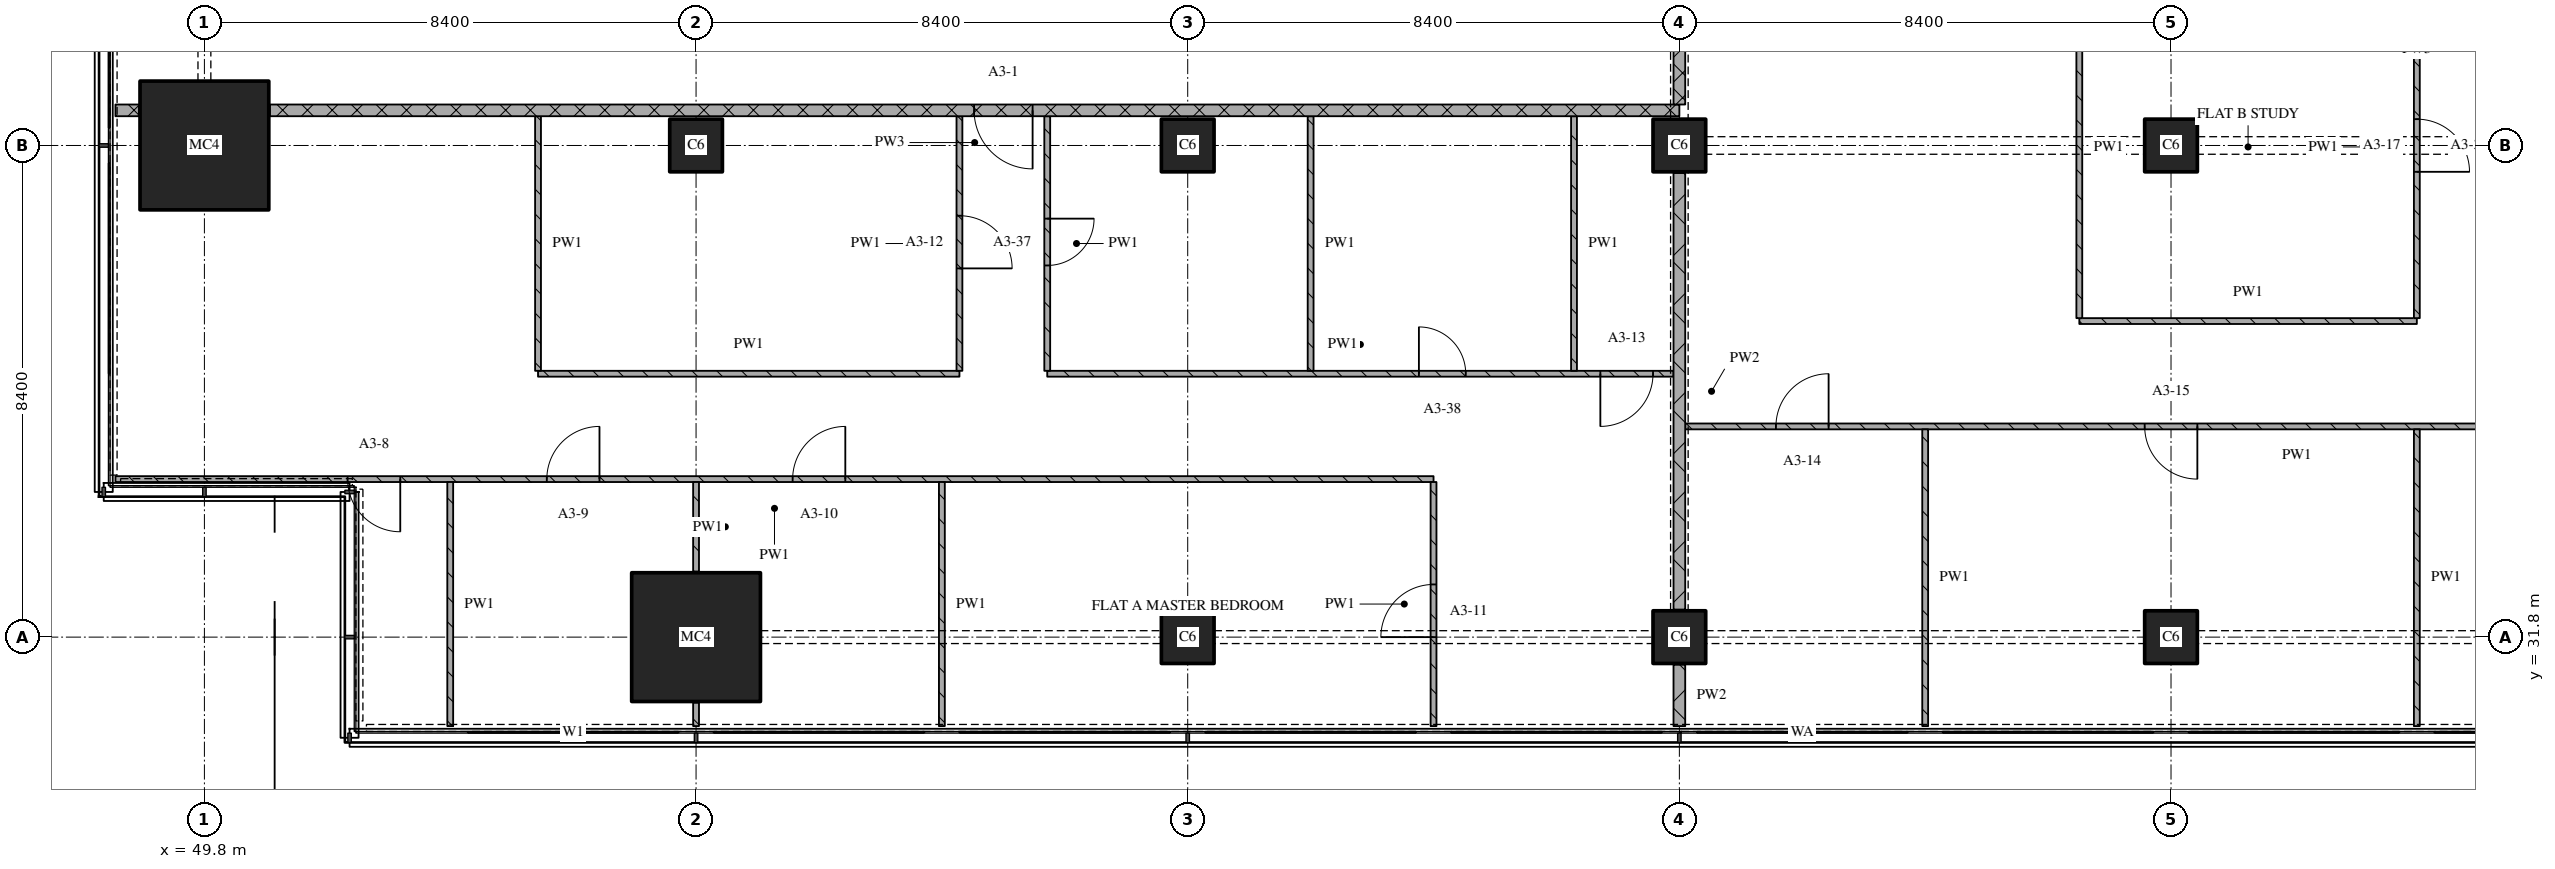
"""IFC4 building model, lengths in metres.
Left out: names, types, materials, properties, quantities, classifications, styles, units other than length and angle.
Written with IfcOpenShell. Run it as: python <this file> out.ifc"""

import sys

from ifc_helpers import new_model, si_unit, direction, frame, frame_2d, origin, origin_2d, place, context, subcontext, project, spatial, rectangle, extrude, element, fill, save


model = new_model("IFC4")
c1 = context("Model", 3, precision=1e-05, world=origin(), true_north=direction((0.0, 1.0)))
c2 = subcontext(c1, "Body", "Model", "MODEL_VIEW")
j1 = project(units=[si_unit("LENGTHUNIT", "METRE"), si_unit("PLANEANGLEUNIT", "RADIAN")], contexts=[c1])
p1 = place(None, origin())
s1 = spatial("IfcSite", under=j1, at=p1, CompositionType="ELEMENT")
p2 = place(p1, origin())
s2 = spatial("IfcBuilding", under=s1, at=p2, CompositionType="ELEMENT")
p3 = place(p2, frame((0.0, 0.0, 58.8)))
s3 = spatial("IfcBuildingStorey", under=s2, at=p3, CompositionType="ELEMENT", Elevation=58.8)
for number, where, z_axis, x_axis in (
    (1, (49.8, 40.2, 0.0), (0.0, 0.0, 1.0), (1.0, 0.0, 0.0)),
    (2, (58.2, 31.8, 0.0), (0.0, 0.0, 1.0), (1.0, 0.0, 0.0)),
):
    element("IfcColumn", number, at=place(p3, frame(where, z_axis=z_axis, x_axis=x_axis)), inside=s3, PredefinedType="COLUMN", context=c2, shape_type="SweptSolid", body=[
        extrude(rectangle(XDim=2.2, YDim=2.2, at=origin_2d()), origin(), (0.0, 0.0, 1.0), 3.6),
    ])
for number, where, z_axis, x_axis in (
    (3, (58.2, 40.2, 0.0), (0.0, 0.0, 1.0), (1.0, 0.0, 0.0)),
    (4, (66.6, 31.8, 0.0), (0.0, 0.0, 1.0), (1.0, 0.0, 0.0)),
    (5, (66.6, 40.2, 0.0), (0.0, 0.0, 1.0), (1.0, 0.0, 0.0)),
    (6, (75.0, 31.8, 0.0), (0.0, 0.0, 1.0), (1.0, 0.0, 0.0)),
    (7, (75.0, 40.2, 0.0), (0.0, 0.0, 1.0), (1.0, 0.0, 0.0)),
    (8, (83.4, 31.8, 0.0), (0.0, 0.0, 1.0), (1.0, 0.0, 0.0)),
    (9, (83.4, 40.2, 0.0), (0.0, 0.0, 1.0), (1.0, 0.0, 0.0)),
):
    element("IfcColumn", number, at=place(p3, frame(where, z_axis=z_axis, x_axis=x_axis)), inside=s3, PredefinedType="COLUMN", context=c2, shape_type="SweptSolid", body=[
        extrude(rectangle(XDim=0.9, YDim=0.9, at=origin_2d()), origin(), (0.0, 0.0, 1.0), 3.6),
    ])
p4 = place(p3, frame((70.8, 34.5, 0.0), z_axis=(0.0, 0.0, 1.0), x_axis=(-1.0, 0.0, 0.0)))
e10 = element("IfcWall", 10, at=p4, inside=s3, PredefinedType="PARTITIONING", context=c2, shape_type="SweptSolid", body=[
    extrude(rectangle(XDim=22.52, YDim=0.1, at=frame_2d((11.26, 0.0))), origin(), (0.0, 0.0, 1.0), 3.32),
])
p5 = place(p4, frame((10.05, 0.0, 0.0)))
e11 = element("IfcOpeningElement", 11, at=p5, cuts=e10, PredefinedType="OPENING", context=c2, shape_type="SweptSolid", body=[
    extrude(rectangle(XDim=0.9, YDim=2.1, at=frame_2d((0.45, 1.05))), frame((0.0, 0.06, 0.0), z_axis=(0.0, -1.0, 0.0), x_axis=(1.0, 0.0, 0.0)), (0.0, 0.0, 1.0), 0.12),
])
p6 = place(p4, frame((14.25, 0.0, 0.0)))
e12 = element("IfcOpeningElement", 12, at=p6, cuts=e10, PredefinedType="OPENING", context=c2, shape_type="SweptSolid", body=[
    extrude(rectangle(XDim=0.9, YDim=2.1, at=frame_2d((0.45, 1.05))), frame((0.0, 0.06, 0.0), z_axis=(0.0, -1.0, 0.0), x_axis=(1.0, 0.0, 0.0)), (0.0, 0.0, 1.0), 0.12),
])
p7 = place(p4, frame((17.654, 0.0, 0.0)))
e13 = element("IfcOpeningElement", 13, at=p7, cuts=e10, PredefinedType="OPENING", context=c2, shape_type="SweptSolid", body=[
    extrude(rectangle(XDim=0.9, YDim=2.1, at=frame_2d((0.45, 1.05))), frame((0.0, 0.06, 0.0), z_axis=(0.0, -1.0, 0.0), x_axis=(1.0, 0.0, 0.0)), (0.0, 0.0, 1.0), 0.12),
])
p8 = place(p3, frame((96.0, 35.4, 0.0), z_axis=(0.0, 0.0, 1.0), x_axis=(-1.0, 0.0, 0.0)))
e14 = element("IfcWall", 14, at=p8, inside=s3, PredefinedType="PARTITIONING", context=c2, shape_type="SweptSolid", body=[
    extrude(rectangle(XDim=20.9, YDim=0.1, at=frame_2d((10.45, 0.0))), origin(), (0.0, 0.0, 1.0), 3.32),
])
p9 = place(p8, frame((12.15, 0.0, 0.0)))
e15 = element("IfcOpeningElement", 15, at=p9, cuts=e14, PredefinedType="OPENING", context=c2, shape_type="SweptSolid", body=[
    extrude(rectangle(XDim=0.9, YDim=2.1, at=frame_2d((0.45, 1.05))), frame((0.0, 0.06, 0.0), z_axis=(0.0, -1.0, 0.0), x_axis=(1.0, 0.0, 0.0)), (0.0, 0.0, 1.0), 0.12),
])
p10 = place(p8, frame((18.45, 0.0, 0.0)))
e16 = element("IfcOpeningElement", 16, at=p10, cuts=e14, PredefinedType="OPENING", context=c2, shape_type="SweptSolid", body=[
    extrude(rectangle(XDim=0.9, YDim=2.1, at=frame_2d((0.45, 1.05))), frame((0.0, 0.06, 0.0), z_axis=(0.0, -1.0, 0.0), x_axis=(1.0, 0.0, 0.0)), (0.0, 0.0, 1.0), 0.12),
])
p11 = place(p3, frame((55.5, 36.3, 0.0), z_axis=(0.0, 0.0, 1.0), x_axis=(1.0, 0.0, 0.0)))
e17 = element("IfcWall", 17, at=p11, inside=s3, PredefinedType="PARTITIONING", context=c2, shape_type="SweptSolid", body=[
    extrude(rectangle(XDim=7.2, YDim=0.1, at=frame_2d((3.6, 0.0))), origin(), (0.0, 0.0, 1.0), 3.32),
])
p12 = place(p3, frame((64.2, 36.3, 0.0), z_axis=(0.0, 0.0, 1.0), x_axis=(1.0, 0.0, 0.0)))
e18 = element("IfcWall", 18, at=p12, inside=s3, PredefinedType="PARTITIONING", context=c2, shape_type="SweptSolid", body=[
    extrude(rectangle(XDim=10.7, YDim=0.1, at=frame_2d((5.35, 0.0))), origin(), (0.0, 0.0, 1.0), 3.32),
])
p13 = place(p12, frame((6.35, 0.0, 0.0)))
e19 = element("IfcOpeningElement", 19, at=p13, cuts=e18, PredefinedType="OPENING", context=c2, shape_type="SweptSolid", body=[
    extrude(rectangle(XDim=0.8, YDim=2.1, at=frame_2d((0.4, 1.05))), frame((0.0, 0.06, 0.0), z_axis=(0.0, -1.0, 0.0), x_axis=(1.0, 0.0, 0.0)), (0.0, 0.0, 1.0), 0.12),
])
p14 = place(p12, frame((9.45, 0.0, 0.0)))
e20 = element("IfcOpeningElement", 20, at=p14, cuts=e18, PredefinedType="OPENING", context=c2, shape_type="SweptSolid", body=[
    extrude(rectangle(XDim=0.9, YDim=2.1, at=frame_2d((0.45, 1.05))), frame((0.0, 0.06, 0.0), z_axis=(0.0, -1.0, 0.0), x_axis=(1.0, 0.0, 0.0)), (0.0, 0.0, 1.0), 0.12),
])
p15 = place(p3, frame((81.833, 37.2, 0.0), z_axis=(0.0, 0.0, 1.0), x_axis=(1.0, 0.0, 0.0)))
e21 = element("IfcWall", 21, at=p15, inside=s3, PredefinedType="PARTITIONING", context=c2, shape_type="SweptSolid", body=[
    extrude(rectangle(XDim=5.767, YDim=0.1, at=frame_2d((2.883, 0.0))), origin(), (0.0, 0.0, 1.0), 3.32),
])
p16 = place(p3, frame((48.28, 40.8, 0.0), z_axis=(0.0, 0.0, 1.0), x_axis=(1.0, 0.0, 0.0)))
e22 = element("IfcWall", 22, at=p16, inside=s3, PredefinedType="PARTITIONING", context=c2, shape_type="SweptSolid", body=[
    extrude(rectangle(XDim=0.4, YDim=0.2, at=frame_2d((0.2, 0.0))), origin(), (0.0, 0.0, 1.0), 3.32),
])
p17 = place(p3, frame((75.0, 40.8, 0.0), z_axis=(0.0, 0.0, 1.0), x_axis=(-1.0, 0.0, 0.0)))
e23 = element("IfcWall", 23, at=p17, inside=s3, PredefinedType="PARTITIONING", context=c2, shape_type="SweptSolid", body=[
    extrude(rectangle(XDim=24.08, YDim=0.2, at=frame_2d((12.04, 0.0))), origin(), (0.0, 0.0, 1.0), 3.32),
])
p18 = place(p17, frame((11.05, 0.0, 0.0)))
e24 = element("IfcOpeningElement", 24, at=p18, cuts=e23, PredefinedType="OPENING", context=c2, shape_type="SweptSolid", body=[
    extrude(rectangle(XDim=1.0, YDim=2.1, at=frame_2d((0.5, 1.05))), frame((0.0, 0.11, 0.0), z_axis=(0.0, -1.0, 0.0), x_axis=(1.0, 0.0, 0.0)), (0.0, 0.0, 1.0), 0.22),
])
p19 = place(p3, frame((54.0, 34.45, 0.0), z_axis=(0.0, 0.0, 1.0), x_axis=(0.0, -1.0, 0.0)))
e25 = element("IfcWall", 25, at=p19, inside=s3, PredefinedType="PARTITIONING", context=c2, shape_type="SweptSolid", body=[
    extrude(rectangle(XDim=4.17, YDim=0.1, at=frame_2d((2.085, 0.0))), origin(), (0.0, 0.0, 1.0), 3.32),
])
p20 = place(p3, frame((55.5, 40.7, 0.0), z_axis=(0.0, 0.0, 1.0), x_axis=(0.0, -1.0, 0.0)))
e26 = element("IfcWall", 26, at=p20, inside=s3, PredefinedType="PARTITIONING", context=c2, shape_type="SweptSolid", body=[
    extrude(rectangle(XDim=4.35, YDim=0.1, at=frame_2d((2.175, 0.0))), origin(), (0.0, 0.0, 1.0), 3.32),
])
p21 = place(p3, frame((58.2, 30.68, 0.0), z_axis=(0.0, 0.0, 1.0), x_axis=(0.0, -1.0, 0.0)))
e27 = element("IfcWall", 27, at=p21, inside=s3, PredefinedType="PARTITIONING", context=c2, shape_type="SweptSolid", body=[
    extrude(rectangle(XDim=0.4, YDim=0.1, at=frame_2d((0.2, 0.0))), origin(), (0.0, 0.0, 1.0), 3.32),
])
p22 = place(p3, frame((58.2, 34.45, 0.0), z_axis=(0.0, 0.0, 1.0), x_axis=(0.0, -1.0, 0.0)))
e28 = element("IfcWall", 28, at=p22, inside=s3, PredefinedType="PARTITIONING", context=c2, shape_type="SweptSolid", body=[
    extrude(rectangle(XDim=1.53, YDim=0.1, at=frame_2d((0.765, 0.0))), origin(), (0.0, 0.0, 1.0), 3.32),
])
p23 = place(p3, frame((62.4, 34.45, 0.0), z_axis=(0.0, 0.0, 1.0), x_axis=(0.0, -1.0, 0.0)))
e29 = element("IfcWall", 29, at=p23, inside=s3, PredefinedType="PARTITIONING", context=c2, shape_type="SweptSolid", body=[
    extrude(rectangle(XDim=4.17, YDim=0.1, at=frame_2d((2.085, 0.0))), origin(), (0.0, 0.0, 1.0), 3.32),
])
p24 = place(p3, frame((62.7, 36.35, 0.0), z_axis=(0.0, 0.0, 1.0), x_axis=(0.0, 1.0, 0.0)))
e30 = element("IfcWall", 30, at=p24, inside=s3, PredefinedType="PARTITIONING", context=c2, shape_type="SweptSolid", body=[
    extrude(rectangle(XDim=4.35, YDim=0.1, at=frame_2d((2.175, 0.0))), origin(), (0.0, 0.0, 1.0), 3.32),
])
p25 = place(p24, frame((1.75, 0.0, 0.0)))
e31 = element("IfcOpeningElement", 31, at=p25, cuts=e30, PredefinedType="OPENING", context=c2, shape_type="SweptSolid", body=[
    extrude(rectangle(XDim=0.9, YDim=2.1, at=frame_2d((0.45, 1.05))), frame((0.0, 0.06, 0.0), z_axis=(0.0, -1.0, 0.0), x_axis=(1.0, 0.0, 0.0)), (0.0, 0.0, 1.0), 0.12),
])
p26 = place(p3, frame((64.2, 40.7, 0.0), z_axis=(0.0, 0.0, 1.0), x_axis=(0.0, -1.0, 0.0)))
e32 = element("IfcWall", 32, at=p26, inside=s3, PredefinedType="PARTITIONING", context=c2, shape_type="SweptSolid", body=[
    extrude(rectangle(XDim=4.35, YDim=0.1, at=frame_2d((2.175, 0.0))), origin(), (0.0, 0.0, 1.0), 3.32),
])
p27 = place(p26, frame((1.75, 0.0, 0.0)))
e33 = element("IfcOpeningElement", 33, at=p27, cuts=e32, PredefinedType="OPENING", context=c2, shape_type="SweptSolid", body=[
    extrude(rectangle(XDim=0.8, YDim=2.1, at=frame_2d((0.4, 1.05))), frame((0.0, 0.06, 0.0), z_axis=(0.0, -1.0, 0.0), x_axis=(1.0, 0.0, 0.0)), (0.0, 0.0, 1.0), 0.12),
])
p28 = place(p3, frame((68.7, 40.7, 0.0), z_axis=(0.0, 0.0, 1.0), x_axis=(0.0, -1.0, 0.0)))
e34 = element("IfcWall", 34, at=p28, inside=s3, PredefinedType="PARTITIONING", context=c2, shape_type="SweptSolid", body=[
    extrude(rectangle(XDim=4.35, YDim=0.1, at=frame_2d((2.175, 0.0))), origin(), (0.0, 0.0, 1.0), 3.32),
])
p29 = place(p3, frame((70.8, 30.28, 0.0), z_axis=(0.0, 0.0, 1.0), x_axis=(0.0, 1.0, 0.0)))
e35 = element("IfcWall", 35, at=p29, inside=s3, PredefinedType="PARTITIONING", context=c2, shape_type="SweptSolid", body=[
    extrude(rectangle(XDim=4.17, YDim=0.1, at=frame_2d((2.085, 0.0))), origin(), (0.0, 0.0, 1.0), 3.32),
])
p30 = place(p29, frame((1.52, 0.0, 0.0)))
e36 = element("IfcOpeningElement", 36, at=p30, cuts=e35, PredefinedType="OPENING", context=c2, shape_type="SweptSolid", body=[
    extrude(rectangle(XDim=0.9, YDim=2.1, at=frame_2d((0.45, 1.05))), frame((0.0, 0.06, 0.0), z_axis=(0.0, -1.0, 0.0), x_axis=(1.0, 0.0, 0.0)), (0.0, 0.0, 1.0), 0.12),
])
p31 = place(p3, frame((73.2, 40.7, 0.0), z_axis=(0.0, 0.0, 1.0), x_axis=(0.0, -1.0, 0.0)))
e37 = element("IfcWall", 37, at=p31, inside=s3, PredefinedType="PARTITIONING", context=c2, shape_type="SweptSolid", body=[
    extrude(rectangle(XDim=4.35, YDim=0.1, at=frame_2d((2.175, 0.0))), origin(), (0.0, 0.0, 1.0), 3.32),
])
p32 = place(p3, frame((75.0, 43.1, 0.0), z_axis=(0.0, 0.0, 1.0), x_axis=(0.0, -1.0, 0.0)))
e38 = element("IfcWall", 38, at=p32, inside=s3, PredefinedType="PARTITIONING", context=c2, shape_type="SweptSolid", body=[
    extrude(rectangle(XDim=2.2, YDim=0.2, at=frame_2d((1.1, 0.0))), origin(), (0.0, 0.0, 1.0), 2.43),
])
p33 = place(p3, frame((75.0, 31.33, 0.0), z_axis=(0.0, 0.0, 1.0), x_axis=(0.0, -1.0, 0.0)))
e39 = element("IfcWall", 39, at=p33, inside=s3, PredefinedType="PARTITIONING", context=c2, shape_type="SweptSolid", body=[
    extrude(rectangle(XDim=1.05, YDim=0.2, at=frame_2d((0.525, 0.0))), origin(), (0.0, 0.0, 1.0), 3.32),
])
p34 = place(p3, frame((75.0, 39.73, 0.0), z_axis=(0.0, 0.0, 1.0), x_axis=(0.0, -1.0, 0.0)))
e40 = element("IfcWall", 40, at=p34, inside=s3, PredefinedType="PARTITIONING", context=c2, shape_type="SweptSolid", body=[
    extrude(rectangle(XDim=7.46, YDim=0.2, at=frame_2d((3.73, 0.0))), origin(), (0.0, 0.0, 1.0), 2.83),
])
p35 = place(p3, frame((79.2, 35.35, 0.0), z_axis=(0.0, 0.0, 1.0), x_axis=(0.0, -1.0, 0.0)))
e41 = element("IfcWall", 41, at=p35, inside=s3, PredefinedType="PARTITIONING", context=c2, shape_type="SweptSolid", body=[
    extrude(rectangle(XDim=5.07, YDim=0.1, at=frame_2d((2.535, 0.0))), origin(), (0.0, 0.0, 1.0), 3.32),
])
p36 = place(p3, frame((81.833, 43.1, 0.0), z_axis=(0.0, 0.0, 1.0), x_axis=(0.0, -1.0, 0.0)))
e42 = element("IfcWall", 42, at=p36, inside=s3, PredefinedType="PARTITIONING", context=c2, shape_type="SweptSolid", body=[
    extrude(rectangle(XDim=5.85, YDim=0.1, at=frame_2d((2.925, 0.0))), origin(), (0.0, 0.0, 1.0), 3.32),
])
p37 = place(p3, frame((87.6, 35.35, 0.0), z_axis=(0.0, 0.0, 1.0), x_axis=(0.0, -1.0, 0.0)))
e43 = element("IfcWall", 43, at=p37, inside=s3, PredefinedType="PARTITIONING", context=c2, shape_type="SweptSolid", body=[
    extrude(rectangle(XDim=5.07, YDim=0.1, at=frame_2d((2.535, 0.0))), origin(), (0.0, 0.0, 1.0), 3.32),
])
p38 = place(p3, frame((87.6, 37.25, 0.0), z_axis=(0.0, 0.0, 1.0), x_axis=(0.0, 1.0, 0.0)))
e44 = element("IfcWall", 44, at=p38, inside=s3, PredefinedType="PARTITIONING", context=c2, shape_type="SweptSolid", body=[
    extrude(rectangle(XDim=5.85, YDim=0.1, at=frame_2d((2.925, 0.0))), origin(), (0.0, 0.0, 1.0), 3.32),
])
p39 = place(p38, frame((2.5, 0.0, 0.0)))
e45 = element("IfcOpeningElement", 45, at=p39, cuts=e44, PredefinedType="OPENING", context=c2, shape_type="SweptSolid", body=[
    extrude(rectangle(XDim=0.9, YDim=2.1, at=frame_2d((0.45, 1.05))), frame((0.0, 0.06, 0.0), z_axis=(0.0, -1.0, 0.0), x_axis=(1.0, 0.0, 0.0)), (0.0, 0.0, 1.0), 0.12),
])
p40 = place(p5, origin())
e46 = element("IfcDoor", 46, at=p40, inside=s3, OperationType="SINGLE_SWING_RIGHT", PredefinedType="DOOR", context=c2, shape_type="SweptSolid", body=[
    extrude(rectangle(XDim=0.9, YDim=2.1, at=frame_2d((0.45, 1.05))), frame((0.0, 0.025, 0.0), z_axis=(0.0, -1.0, 0.0), x_axis=(1.0, 0.0, 0.0)), (0.0, 0.0, 1.0), 0.05),
])
fill(e11, e46)
p41 = place(p6, origin())
e47 = element("IfcDoor", 47, at=p41, inside=s3, OperationType="SINGLE_SWING_RIGHT", PredefinedType="DOOR", context=c2, shape_type="SweptSolid", body=[
    extrude(rectangle(XDim=0.9, YDim=2.1, at=frame_2d((0.45, 1.05))), frame((0.0, 0.025, 0.0), z_axis=(0.0, -1.0, 0.0), x_axis=(1.0, 0.0, 0.0)), (0.0, 0.0, 1.0), 0.05),
])
fill(e12, e47)
p42 = place(p7, origin())
e48 = element("IfcDoor", 48, at=p42, inside=s3, OperationType="SINGLE_SWING_LEFT", PredefinedType="DOOR", context=c2, shape_type="SweptSolid", body=[
    extrude(rectangle(XDim=0.9, YDim=2.1, at=frame_2d((0.45, 1.05))), frame((0.0, 0.025, 0.0), z_axis=(0.0, -1.0, 0.0), x_axis=(1.0, 0.0, 0.0)), (0.0, 0.0, 1.0), 0.05),
])
fill(e13, e48)
p43 = place(p9, origin())
e49 = element("IfcDoor", 49, at=p43, inside=s3, OperationType="SINGLE_SWING_LEFT", PredefinedType="DOOR", context=c2, shape_type="SweptSolid", body=[
    extrude(rectangle(XDim=0.9, YDim=2.1, at=frame_2d((0.45, 1.05))), frame((0.0, 0.025, 0.0), z_axis=(0.0, -1.0, 0.0), x_axis=(1.0, 0.0, 0.0)), (0.0, 0.0, 1.0), 0.05),
])
fill(e15, e49)
p44 = place(p10, origin())
e50 = element("IfcDoor", 50, at=p44, inside=s3, OperationType="SINGLE_SWING_RIGHT", PredefinedType="DOOR", context=c2, shape_type="SweptSolid", body=[
    extrude(rectangle(XDim=0.9, YDim=2.1, at=frame_2d((0.45, 1.05))), frame((0.0, 0.025, 0.0), z_axis=(0.0, -1.0, 0.0), x_axis=(1.0, 0.0, 0.0)), (0.0, 0.0, 1.0), 0.05),
])
fill(e16, e50)
p45 = place(p13, origin())
e51 = element("IfcDoor", 51, at=p45, inside=s3, OperationType="SINGLE_SWING_LEFT", PredefinedType="DOOR", context=c2, shape_type="SweptSolid", body=[
    extrude(rectangle(XDim=0.8, YDim=2.1, at=frame_2d((0.4, 1.05))), frame((0.0, 0.025, 0.0), z_axis=(0.0, -1.0, 0.0), x_axis=(1.0, 0.0, 0.0)), (0.0, 0.0, 1.0), 0.05),
])
fill(e19, e51)
p46 = place(p14, origin())
e52 = element("IfcDoor", 52, at=p46, inside=s3, OperationType="SINGLE_SWING_RIGHT", PredefinedType="DOOR", context=c2, shape_type="SweptSolid", body=[
    extrude(rectangle(XDim=0.9, YDim=2.1, at=frame_2d((0.45, 1.05))), frame((0.0, 0.025, 0.0), z_axis=(0.0, -1.0, 0.0), x_axis=(1.0, 0.0, 0.0)), (0.0, 0.0, 1.0), 0.05),
])
fill(e20, e52)
p47 = place(p18, origin())
e53 = element("IfcDoor", 53, at=p47, inside=s3, OperationType="SINGLE_SWING_LEFT", PredefinedType="DOOR", context=c2, shape_type="SweptSolid", body=[
    extrude(rectangle(XDim=1.0, YDim=2.1, at=frame_2d((0.5, 1.05))), frame((0.0, 0.025, 0.0), z_axis=(0.0, -1.0, 0.0), x_axis=(1.0, 0.0, 0.0)), (0.0, 0.0, 1.0), 0.05),
])
fill(e24, e53)
p48 = place(p25, origin())
e54 = element("IfcDoor", 54, at=p48, inside=s3, OperationType="SINGLE_SWING_RIGHT", PredefinedType="DOOR", context=c2, shape_type="SweptSolid", body=[
    extrude(rectangle(XDim=0.9, YDim=2.1, at=frame_2d((0.45, 1.05))), frame((0.0, 0.025, 0.0), z_axis=(0.0, -1.0, 0.0), x_axis=(1.0, 0.0, 0.0)), (0.0, 0.0, 1.0), 0.05),
])
fill(e31, e54)
p49 = place(p27, origin())
e55 = element("IfcDoor", 55, at=p49, inside=s3, OperationType="SINGLE_SWING_LEFT", PredefinedType="DOOR", context=c2, shape_type="SweptSolid", body=[
    extrude(rectangle(XDim=0.8, YDim=2.1, at=frame_2d((0.4, 1.05))), frame((0.0, 0.025, 0.0), z_axis=(0.0, -1.0, 0.0), x_axis=(1.0, 0.0, 0.0)), (0.0, 0.0, 1.0), 0.05),
])
fill(e33, e55)
p50 = place(p30, origin())
e56 = element("IfcDoor", 56, at=p50, inside=s3, OperationType="SINGLE_SWING_LEFT", PredefinedType="DOOR", context=c2, shape_type="SweptSolid", body=[
    extrude(rectangle(XDim=0.9, YDim=2.1, at=frame_2d((0.45, 1.05))), frame((0.0, 0.025, 0.0), z_axis=(0.0, -1.0, 0.0), x_axis=(1.0, 0.0, 0.0)), (0.0, 0.0, 1.0), 0.05),
])
fill(e36, e56)
p51 = place(p39, origin())
e57 = element("IfcDoor", 57, at=p51, inside=s3, OperationType="SINGLE_SWING_RIGHT", PredefinedType="DOOR", context=c2, shape_type="SweptSolid", body=[
    extrude(rectangle(XDim=0.9, YDim=2.1, at=frame_2d((0.45, 1.05))), frame((0.0, 0.025, 0.0), z_axis=(0.0, -1.0, 0.0), x_axis=(1.0, 0.0, 0.0)), (0.0, 0.0, 1.0), 0.05),
])
fill(e45, e57)
save(model, sys.argv[1])
